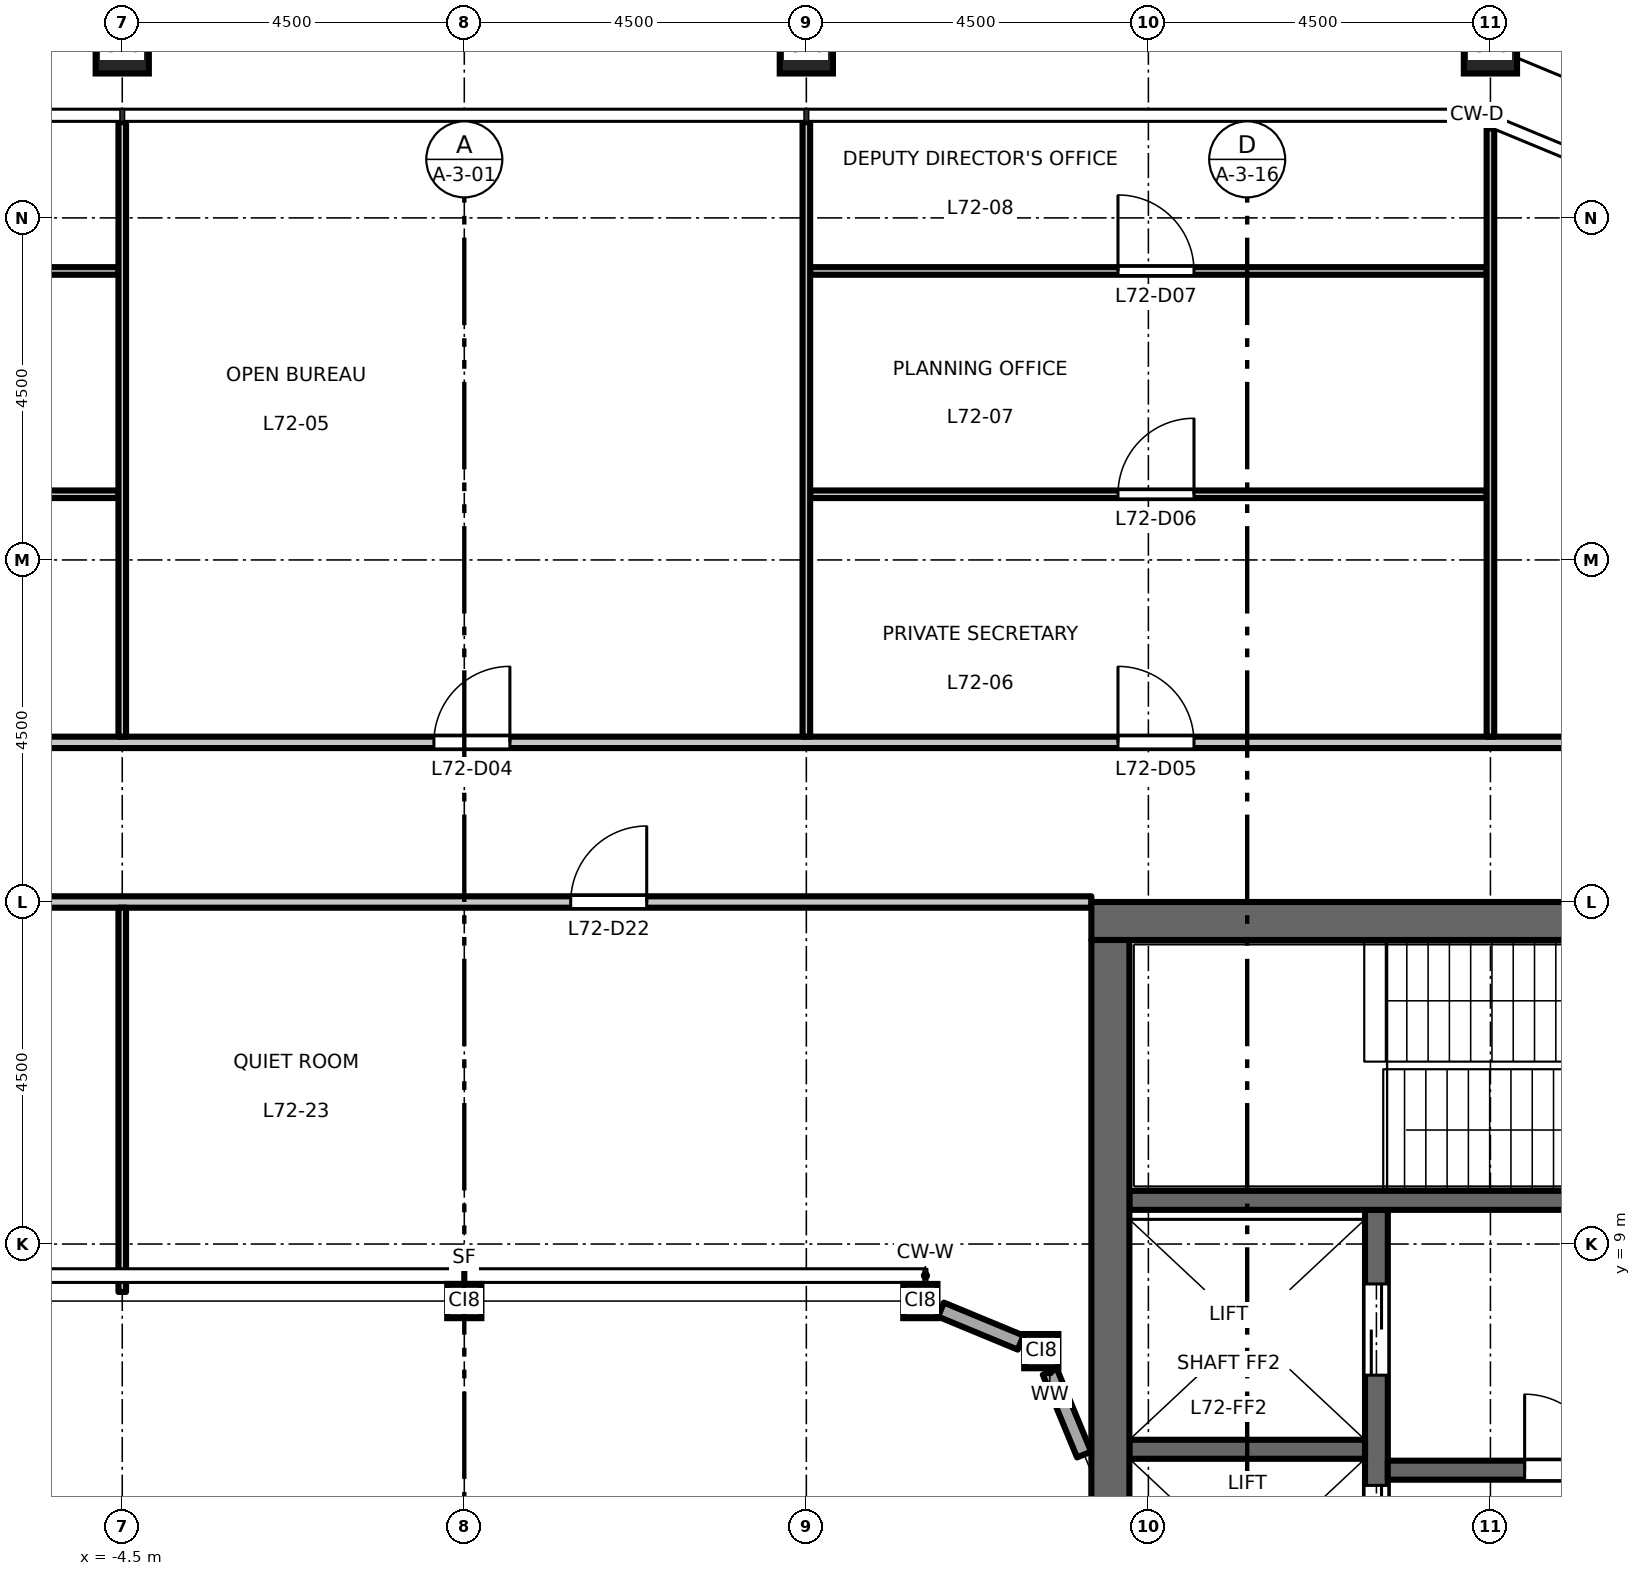
"""IFC4 building model, lengths in metres.
Left out: names, types, materials, properties, quantities, classifications, styles, units other than length and angle.
Written with IfcOpenShell. Run it as: python <this file> out.ifc"""

import sys

from ifc_helpers import new_model, si_unit, direction, frame, frame_2d, origin, origin_2d, place, context, subcontext, project, spatial, rectangle, hollow_rectangle, extrude, element, fill, save


model = new_model("IFC4")
c1 = context("Model", 3, precision=1e-05, world=origin(), true_north=direction((0.0, 1.0)))
c2 = subcontext(c1, "Body", "Model", "MODEL_VIEW")
j1 = project(units=[si_unit("LENGTHUNIT", "METRE"), si_unit("PLANEANGLEUNIT", "RADIAN")], contexts=[c1])
p1 = place(None, origin())
s1 = spatial("IfcSite", under=j1, at=p1, CompositionType="ELEMENT")
p2 = place(p1, origin())
s2 = spatial("IfcBuilding", under=s1, at=p2, CompositionType="ELEMENT")
p3 = place(p2, frame((0.0, 0.0, 334.7)))
s3 = spatial("IfcBuildingStorey", under=s2, at=p3, CompositionType="ELEMENT", Elevation=334.7)
for number, where, z_axis, x_axis in (
    (1, (13.5, 24.75, 0.0), (0.0, 0.0, 1.0), (1.0, 0.0, 0.0)),
    (2, (4.5, 24.75, 0.0), (0.0, 0.0, 1.0), (1.0, 0.0, 0.0)),
    (3, (-4.5, 24.75, 0.0), (0.0, 0.0, 1.0), (1.0, 0.0, 0.0)),
):
    element("IfcColumn", number, at=place(p3, frame(where, z_axis=z_axis, x_axis=x_axis)), inside=s3, PredefinedType="COLUMN", context=c2, shape_type="SweptSolid", body=[
        extrude(hollow_rectangle(XDim=0.7, YDim=0.7, WallThickness=0.036, at=origin_2d()), origin(), (0.0, 0.0, 1.0), 4.5),
    ])
for number, where, z_axis, x_axis in (
    (4, (0.0, 8.25, 0.0), (0.0, 0.0, 1.0), (1.0, 0.0, 0.0)),
    (5, (6.0, 8.25, 0.0), (0.0, 0.0, 1.0), (1.0, 0.0, 0.0)),
    (6, (7.591, 7.591, 0.0), (0.0, 0.0, 1.0), (1.0, 0.0, 0.0)),
):
    element("IfcColumn", number, at=place(p3, frame(where, z_axis=z_axis, x_axis=x_axis)), inside=s3, PredefinedType="COLUMN", context=c2, shape_type="SweptSolid", body=[
        extrude(hollow_rectangle(XDim=0.45, YDim=0.45, WallThickness=0.022, at=origin_2d()), origin(), (0.0, 0.0, 1.0), 4.5),
    ])
p4 = place(p3, frame((12.0, -9.45, 0.0), z_axis=(0.0, 0.0, 1.0), x_axis=(0.0, 1.0, 0.0)))
e7 = element("IfcWall", 7, at=p4, inside=s3, PredefinedType="SHEAR", context=c2, shape_type="SweptSolid", body=[
    extrude(rectangle(XDim=18.9, YDim=0.3, at=frame_2d((9.45, 0.0))), origin(), (0.0, 0.0, 1.0), 4.35),
])
p5 = place(p4, frame((4.725, 0.0, 0.0)))
e8 = element("IfcOpeningElement", 8, at=p5, cuts=e7, PredefinedType="OPENING", context=c2, shape_type="SweptSolid", body=[
    extrude(rectangle(XDim=1.1, YDim=2.1, at=frame_2d((0.55, 1.05))), frame((0.0, 0.16, 0.0), z_axis=(0.0, -1.0, 0.0), x_axis=(1.0, 0.0, 0.0)), (0.0, 0.0, 1.0), 0.32),
])
p6 = place(p4, frame((7.875, 0.0, 0.0)))
e9 = element("IfcOpeningElement", 9, at=p6, cuts=e7, PredefinedType="OPENING", context=c2, shape_type="SweptSolid", body=[
    extrude(rectangle(XDim=1.1, YDim=2.1, at=frame_2d((0.55, 1.05))), frame((0.0, 0.16, 0.0), z_axis=(0.0, -1.0, 0.0), x_axis=(1.0, 0.0, 0.0)), (0.0, 0.0, 1.0), 0.32),
])
p7 = place(p4, frame((11.025, 0.0, 0.0)))
e10 = element("IfcOpeningElement", 10, at=p7, cuts=e7, PredefinedType="OPENING", context=c2, shape_type="SweptSolid", body=[
    extrude(rectangle(XDim=1.1, YDim=2.1, at=frame_2d((0.55, 1.05))), frame((0.0, 0.16, 0.0), z_axis=(0.0, -1.0, 0.0), x_axis=(1.0, 0.0, 0.0)), (0.0, 0.0, 1.0), 0.32),
])
p8 = place(p4, frame((14.175, 0.0, 0.0)))
e11 = element("IfcOpeningElement", 11, at=p8, cuts=e7, PredefinedType="OPENING", context=c2, shape_type="SweptSolid", body=[
    extrude(rectangle(XDim=1.1, YDim=2.1, at=frame_2d((0.55, 1.05))), frame((0.0, 0.16, 0.0), z_axis=(0.0, -1.0, 0.0), x_axis=(1.0, 0.0, 0.0)), (0.0, 0.0, 1.0), 0.32),
])
p9 = place(p4, frame((16.725, 0.0, 0.0)))
e12 = element("IfcOpeningElement", 12, at=p9, cuts=e7, PredefinedType="OPENING", context=c2, shape_type="SweptSolid", body=[
    extrude(rectangle(XDim=1.2, YDim=2.1, at=frame_2d((0.6, 1.05))), frame((0.0, 0.16, 0.0), z_axis=(0.0, -1.0, 0.0), x_axis=(1.0, 0.0, 0.0)), (0.0, 0.0, 1.0), 0.32),
])
p10 = place(p4, frame((0.975, 0.0, 0.0)))
e13 = element("IfcOpeningElement", 13, at=p10, cuts=e7, PredefinedType="OPENING", context=c2, shape_type="SweptSolid", body=[
    extrude(rectangle(XDim=1.2, YDim=2.1, at=frame_2d((0.6, 1.05))), frame((0.0, 0.16, 0.0), z_axis=(0.0, -1.0, 0.0), x_axis=(1.0, 0.0, 0.0)), (0.0, 0.0, 1.0), 0.32),
])
p11 = place(p3, frame((12.15, 6.025, 0.0), z_axis=(0.0, 0.0, 1.0), x_axis=(1.0, 0.0, 0.0)))
e14 = element("IfcWall", 14, at=p11, inside=s3, PredefinedType="SHEAR", context=c2, shape_type="SweptSolid", body=[
    extrude(rectangle(XDim=4.6, YDim=0.25, at=frame_2d((2.3, 0.0))), origin(), (0.0, 0.0, 1.0), 4.35),
])
p12 = place(p11, frame((1.8, 0.0, 0.0)))
e15 = element("IfcOpeningElement", 15, at=p12, cuts=e14, PredefinedType="OPENING", context=c2, shape_type="SweptSolid", body=[
    extrude(rectangle(XDim=1.0, YDim=2.1, at=frame_2d((0.5, 1.05))), frame((0.0, 0.135, 0.0), z_axis=(0.0, -1.0, 0.0), x_axis=(1.0, 0.0, 0.0)), (0.0, 0.0, 1.0), 0.27),
])
p13 = place(p3, frame((8.75, 6.3, 0.0), z_axis=(0.0, 0.0, 1.0), x_axis=(1.0, 0.0, 0.0)))
e16 = element("IfcWall", 16, at=p13, inside=s3, PredefinedType="SHEAR", context=c2, shape_type="SweptSolid", body=[
    extrude(rectangle(XDim=3.1, YDim=0.25, at=frame_2d((1.55, 0.0))), origin(), (0.0, 0.0, 1.0), 4.35),
])
p14 = place(p3, frame((8.75, 9.575, 0.0), z_axis=(0.0, 0.0, 1.0), x_axis=(1.0, 0.0, 0.0)))
e17 = element("IfcWall", 17, at=p14, inside=s3, PredefinedType="SHEAR", context=c2, shape_type="SweptSolid", body=[
    extrude(rectangle(XDim=8.0, YDim=0.25, at=frame_2d((4.0, 0.0))), origin(), (0.0, 0.0, 1.0), 4.35),
])
p15 = place(p14, frame((6.65, 0.0, 0.0)))
e18 = element("IfcOpeningElement", 18, at=p15, cuts=e17, PredefinedType="OPENING", context=c2, shape_type="SweptSolid", body=[
    extrude(rectangle(XDim=1.1, YDim=2.1, at=frame_2d((0.55, 1.05))), frame((0.0, 0.135, 0.0), z_axis=(0.0, -1.0, 0.0), x_axis=(1.0, 0.0, 0.0)), (0.0, 0.0, 1.0), 0.27),
])
p16 = place(p3, frame((8.25, 13.25, 0.0), z_axis=(0.0, 0.0, 1.0), x_axis=(1.0, 0.0, 0.0)))
e19 = element("IfcWall", 19, at=p16, inside=s3, PredefinedType="SHEAR", context=c2, shape_type="SweptSolid", body=[
    extrude(rectangle(XDim=9.0, YDim=0.5, at=frame_2d((4.5, 0.0))), origin(), (0.0, 0.0, 1.0), 4.35),
])
p17 = place(p3, frame((8.5, -13.0, 0.0), z_axis=(0.0, 0.0, 1.0), x_axis=(0.0, 1.0, 0.0)))
e20 = element("IfcWall", 20, at=p17, inside=s3, PredefinedType="SHEAR", context=c2, shape_type="SweptSolid", body=[
    extrude(rectangle(XDim=26.0, YDim=0.5, at=frame_2d((13.0, 0.0))), origin(), (0.0, 0.0, 1.0), 4.35),
])
p18 = place(p3, frame((8.154, 6.231, 0.0), z_axis=(0.0, 0.0, 1.0), x_axis=(-0.382760542083, 0.92384758885, 0.0)))
e21 = element("IfcWall", 21, at=p18, inside=s3, PredefinedType="STANDARD", context=c2, shape_type="SweptSolid", body=[
    extrude(rectangle(XDim=1.178, YDim=0.2, at=frame_2d((0.589, 0.0))), origin(), (0.0, 0.0, 1.0), 4.01),
])
p19 = place(p3, frame((7.319, 7.703, 0.0), z_axis=(0.0, 0.0, 1.0), x_axis=(-0.923864661962, 0.382719331074, 0.0)))
e22 = element("IfcWall", 22, at=p19, inside=s3, PredefinedType="STANDARD", context=c2, shape_type="SweptSolid", body=[
    extrude(rectangle(XDim=1.134, YDim=0.2, at=frame_2d((0.567, 0.0))), origin(), (0.0, 0.0, 1.0), 4.01),
])
p20 = place(p3, frame((-8.25, 13.5, 0.0), z_axis=(0.0, 0.0, 1.0), x_axis=(1.0, 0.0, 0.0)))
e23 = element("IfcWall", 23, at=p20, inside=s3, PredefinedType="PARTITIONING", context=c2, shape_type="SweptSolid", body=[
    extrude(rectangle(XDim=16.5, YDim=0.15, at=frame_2d((8.25, 0.0))), origin(), (0.0, 0.0, 1.0), 4.35),
])
p21 = place(p20, frame((1.4, 0.0, 0.0)))
e24 = element("IfcOpeningElement", 24, at=p21, cuts=e23, PredefinedType="OPENING", context=c2, shape_type="SweptSolid", body=[
    extrude(rectangle(XDim=1.0, YDim=2.1, at=frame_2d((0.5, 1.05))), frame((0.0, 0.085, 0.0), z_axis=(0.0, -1.0, 0.0), x_axis=(1.0, 0.0, 0.0)), (0.0, 0.0, 1.0), 0.17),
])
p22 = place(p20, frame((9.65, 0.0, 0.0)))
e25 = element("IfcOpeningElement", 25, at=p22, cuts=e23, PredefinedType="OPENING", context=c2, shape_type="SweptSolid", body=[
    extrude(rectangle(XDim=1.0, YDim=2.1, at=frame_2d((0.5, 1.05))), frame((0.0, 0.085, 0.0), z_axis=(0.0, -1.0, 0.0), x_axis=(1.0, 0.0, 0.0)), (0.0, 0.0, 1.0), 0.17),
])
p23 = place(p3, frame((-22.808, 15.6, 0.0), z_axis=(0.0, 0.0, 1.0), x_axis=(1.0, 0.0, 0.0)))
e26 = element("IfcWall", 26, at=p23, inside=s3, PredefinedType="PARTITIONING", context=c2, shape_type="SweptSolid", body=[
    extrude(rectangle(XDim=45.616, YDim=0.15, at=frame_2d((22.808, 0.0))), origin(), (0.0, 0.0, 1.0), 4.35),
])
p24 = place(p23, frame((13.408, 0.0, 0.0)))
e27 = element("IfcOpeningElement", 27, at=p24, cuts=e26, PredefinedType="OPENING", context=c2, shape_type="SweptSolid", body=[
    extrude(rectangle(XDim=1.0, YDim=2.1, at=frame_2d((0.5, 1.05))), frame((0.0, 0.085, 0.0), z_axis=(0.0, -1.0, 0.0), x_axis=(1.0, 0.0, 0.0)), (0.0, 0.0, 1.0), 0.17),
])
p25 = place(p23, frame((22.408, 0.0, 0.0)))
e28 = element("IfcOpeningElement", 28, at=p25, cuts=e26, PredefinedType="OPENING", context=c2, shape_type="SweptSolid", body=[
    extrude(rectangle(XDim=1.0, YDim=2.1, at=frame_2d((0.5, 1.05))), frame((0.0, 0.085, 0.0), z_axis=(0.0, -1.0, 0.0), x_axis=(1.0, 0.0, 0.0)), (0.0, 0.0, 1.0), 0.17),
])
p26 = place(p23, frame((31.408, 0.0, 0.0)))
e29 = element("IfcOpeningElement", 29, at=p26, cuts=e26, PredefinedType="OPENING", context=c2, shape_type="SweptSolid", body=[
    extrude(rectangle(XDim=1.0, YDim=2.1, at=frame_2d((0.5, 1.05))), frame((0.0, 0.085, 0.0), z_axis=(0.0, -1.0, 0.0), x_axis=(1.0, 0.0, 0.0)), (0.0, 0.0, 1.0), 0.17),
])
p27 = place(p23, frame((4.158, 0.0, 0.0)))
e30 = element("IfcOpeningElement", 30, at=p27, cuts=e26, PredefinedType="OPENING", context=c2, shape_type="SweptSolid", body=[
    extrude(rectangle(XDim=1.0, YDim=2.1, at=frame_2d((0.5, 1.05))), frame((0.0, 0.085, 0.0), z_axis=(0.0, -1.0, 0.0), x_axis=(1.0, 0.0, 0.0)), (0.0, 0.0, 1.0), 0.17),
])
p28 = place(p23, frame((40.466, 0.0, 0.0)))
e31 = element("IfcOpeningElement", 31, at=p28, cuts=e26, PredefinedType="OPENING", context=c2, shape_type="SweptSolid", body=[
    extrude(rectangle(XDim=1.0, YDim=2.1, at=frame_2d((0.5, 1.05))), frame((0.0, 0.085, 0.0), z_axis=(0.0, -1.0, 0.0), x_axis=(1.0, 0.0, 0.0)), (0.0, 0.0, 1.0), 0.17),
])
p29 = place(p3, frame((-13.45, 18.864, 0.0), z_axis=(0.0, 0.0, 1.0), x_axis=(1.0, 0.0, 0.0)))
e32 = element("IfcWall", 32, at=p29, inside=s3, PredefinedType="PARTITIONING", context=c2, shape_type="SweptSolid", body=[
    extrude(rectangle(XDim=8.9, YDim=0.1, at=frame_2d((4.45, 0.0))), origin(), (0.0, 0.0, 1.0), 4.35),
])
p30 = place(p29, frame((4.05, 0.0, 0.0)))
e33 = element("IfcOpeningElement", 33, at=p30, cuts=e32, PredefinedType="OPENING", context=c2, shape_type="SweptSolid", body=[
    extrude(rectangle(XDim=1.0, YDim=2.1, at=frame_2d((0.5, 1.05))), frame((0.0, 0.06, 0.0), z_axis=(0.0, -1.0, 0.0), x_axis=(1.0, 0.0, 0.0)), (0.0, 0.0, 1.0), 0.12),
])
p31 = place(p3, frame((4.55, 18.864, 0.0), z_axis=(0.0, 0.0, 1.0), x_axis=(1.0, 0.0, 0.0)))
e34 = element("IfcWall", 34, at=p31, inside=s3, PredefinedType="PARTITIONING", context=c2, shape_type="SweptSolid", body=[
    extrude(rectangle(XDim=8.9, YDim=0.1, at=frame_2d((4.45, 0.0))), origin(), (0.0, 0.0, 1.0), 4.35),
])
p32 = place(p31, frame((4.05, 0.0, 0.0)))
e35 = element("IfcOpeningElement", 35, at=p32, cuts=e34, PredefinedType="OPENING", context=c2, shape_type="SweptSolid", body=[
    extrude(rectangle(XDim=1.0, YDim=2.1, at=frame_2d((0.5, 1.05))), frame((0.0, 0.06, 0.0), z_axis=(0.0, -1.0, 0.0), x_axis=(1.0, 0.0, 0.0)), (0.0, 0.0, 1.0), 0.12),
])
p33 = place(p3, frame((-13.45, 21.802, 0.0), z_axis=(0.0, 0.0, 1.0), x_axis=(1.0, 0.0, 0.0)))
e36 = element("IfcWall", 36, at=p33, inside=s3, PredefinedType="PARTITIONING", context=c2, shape_type="SweptSolid", body=[
    extrude(rectangle(XDim=8.9, YDim=0.1, at=frame_2d((4.45, 0.0))), origin(), (0.0, 0.0, 1.0), 4.35),
])
p34 = place(p33, frame((4.05, 0.0, 0.0)))
e37 = element("IfcOpeningElement", 37, at=p34, cuts=e36, PredefinedType="OPENING", context=c2, shape_type="SweptSolid", body=[
    extrude(rectangle(XDim=1.0, YDim=2.1, at=frame_2d((0.5, 1.05))), frame((0.0, 0.06, 0.0), z_axis=(0.0, -1.0, 0.0), x_axis=(1.0, 0.0, 0.0)), (0.0, 0.0, 1.0), 0.12),
])
p35 = place(p3, frame((4.55, 21.802, 0.0), z_axis=(0.0, 0.0, 1.0), x_axis=(1.0, 0.0, 0.0)))
e38 = element("IfcWall", 38, at=p35, inside=s3, PredefinedType="PARTITIONING", context=c2, shape_type="SweptSolid", body=[
    extrude(rectangle(XDim=8.9, YDim=0.1, at=frame_2d((4.45, 0.0))), origin(), (0.0, 0.0, 1.0), 4.35),
])
p36 = place(p35, frame((4.05, 0.0, 0.0)))
e39 = element("IfcOpeningElement", 39, at=p36, cuts=e38, PredefinedType="OPENING", context=c2, shape_type="SweptSolid", body=[
    extrude(rectangle(XDim=1.0, YDim=2.1, at=frame_2d((0.5, 1.05))), frame((0.0, 0.06, 0.0), z_axis=(0.0, -1.0, 0.0), x_axis=(1.0, 0.0, 0.0)), (0.0, 0.0, 1.0), 0.12),
])
p37 = place(p3, frame((-4.5, 8.37, 0.0), z_axis=(0.0, 0.0, 1.0), x_axis=(0.0, 1.0, 0.0)))
e40 = element("IfcWall", 40, at=p37, inside=s3, PredefinedType="PARTITIONING", context=c2, shape_type="SweptSolid", body=[
    extrude(rectangle(XDim=5.055, YDim=0.1, at=frame_2d((2.527, 0.0))), origin(), (0.0, 0.0, 1.0), 3.65),
])
for number, where, z_axis, x_axis in (
    (41, (-4.5, 15.675, 0.0), (0.0, 0.0, 1.0), (0.0, 1.0, 0.0)),
    (42, (4.5, 15.675, 0.0), (0.0, 0.0, 1.0), (0.0, 1.0, 0.0)),
):
    element("IfcWall", number, at=place(p3, frame(where, z_axis=z_axis, x_axis=x_axis)), inside=s3, PredefinedType="PARTITIONING", context=c2, shape_type="SweptSolid", body=[
        extrude(rectangle(XDim=8.085, YDim=0.1, at=frame_2d((4.042, 0.0))), origin(), (0.0, 0.0, 1.0), 3.65),
    ])
p38 = place(p3, frame((13.5, 15.675, 0.0), z_axis=(0.0, 0.0, 1.0), x_axis=(0.0, 1.0, 0.0)))
e43 = element("IfcWall", 43, at=p38, inside=s3, PredefinedType="PARTITIONING", context=c2, shape_type="SweptSolid", body=[
    extrude(rectangle(XDim=8.003, YDim=0.1, at=frame_2d((4.001, 0.0))), origin(), (0.0, 0.0, 1.0), 3.75),
])
p39 = place(p12, origin())
e44 = element("IfcDoor", 44, at=p39, inside=s3, OperationType="SINGLE_SWING_RIGHT", PredefinedType="DOOR", context=c2, shape_type="SweptSolid", body=[
    extrude(rectangle(XDim=1.0, YDim=2.1, at=frame_2d((0.5, 1.05))), frame((0.0, 0.025, 0.0), z_axis=(0.0, -1.0, 0.0), x_axis=(1.0, 0.0, 0.0)), (0.0, 0.0, 1.0), 0.05),
])
fill(e15, e44)
p40 = place(p8, origin())
e45 = element("IfcDoor", 45, at=p40, inside=s3, OperationType="DOUBLE_DOOR_SLIDING", PredefinedType="DOOR", context=c2, shape_type="SweptSolid", body=[
    extrude(rectangle(XDim=1.1, YDim=2.1, at=frame_2d((0.55, 1.05))), frame((0.0, 0.025, 0.0), z_axis=(0.0, -1.0, 0.0), x_axis=(1.0, 0.0, 0.0)), (0.0, 0.0, 1.0), 0.05),
])
fill(e11, e45)
p41 = place(p9, origin())
e46 = element("IfcDoor", 46, at=p41, inside=s3, OperationType="DOUBLE_DOOR_SLIDING", PredefinedType="DOOR", context=c2, shape_type="SweptSolid", body=[
    extrude(rectangle(XDim=1.2, YDim=2.1, at=frame_2d((0.6, 1.05))), frame((0.0, 0.025, 0.0), z_axis=(0.0, -1.0, 0.0), x_axis=(1.0, 0.0, 0.0)), (0.0, 0.0, 1.0), 0.05),
])
fill(e12, e46)
p42 = place(p25, origin())
e47 = element("IfcDoor", 47, at=p42, inside=s3, OperationType="SINGLE_SWING_RIGHT", PredefinedType="DOOR", context=c2, shape_type="SweptSolid", body=[
    extrude(rectangle(XDim=1.0, YDim=2.1, at=frame_2d((0.5, 1.05))), frame((0.0, 0.025, 0.0), z_axis=(0.0, -1.0, 0.0), x_axis=(1.0, 0.0, 0.0)), (0.0, 0.0, 1.0), 0.05),
])
fill(e28, e47)
p43 = place(p26, origin())
e48 = element("IfcDoor", 48, at=p43, inside=s3, OperationType="SINGLE_SWING_LEFT", PredefinedType="DOOR", context=c2, shape_type="SweptSolid", body=[
    extrude(rectangle(XDim=1.0, YDim=2.1, at=frame_2d((0.5, 1.05))), frame((0.0, 0.025, 0.0), z_axis=(0.0, -1.0, 0.0), x_axis=(1.0, 0.0, 0.0)), (0.0, 0.0, 1.0), 0.05),
])
fill(e29, e48)
p44 = place(p32, origin())
e49 = element("IfcDoor", 49, at=p44, inside=s3, OperationType="SINGLE_SWING_RIGHT", PredefinedType="DOOR", context=c2, shape_type="SweptSolid", body=[
    extrude(rectangle(XDim=1.0, YDim=2.1, at=frame_2d((0.5, 1.05))), frame((0.0, 0.025, 0.0), z_axis=(0.0, -1.0, 0.0), x_axis=(1.0, 0.0, 0.0)), (0.0, 0.0, 1.0), 0.05),
])
fill(e35, e49)
p45 = place(p36, origin())
e50 = element("IfcDoor", 50, at=p45, inside=s3, OperationType="SINGLE_SWING_LEFT", PredefinedType="DOOR", context=c2, shape_type="SweptSolid", body=[
    extrude(rectangle(XDim=1.0, YDim=2.1, at=frame_2d((0.5, 1.05))), frame((0.0, 0.025, 0.0), z_axis=(0.0, -1.0, 0.0), x_axis=(1.0, 0.0, 0.0)), (0.0, 0.0, 1.0), 0.05),
])
fill(e39, e50)
p46 = place(p22, origin())
e51 = element("IfcDoor", 51, at=p46, inside=s3, OperationType="SINGLE_SWING_RIGHT", PredefinedType="DOOR", context=c2, shape_type="SweptSolid", body=[
    extrude(rectangle(XDim=1.0, YDim=2.1, at=frame_2d((0.5, 1.05))), frame((0.0, 0.025, 0.0), z_axis=(0.0, -1.0, 0.0), x_axis=(1.0, 0.0, 0.0)), (0.0, 0.0, 1.0), 0.05),
])
fill(e25, e51)
save(model, sys.argv[1])
